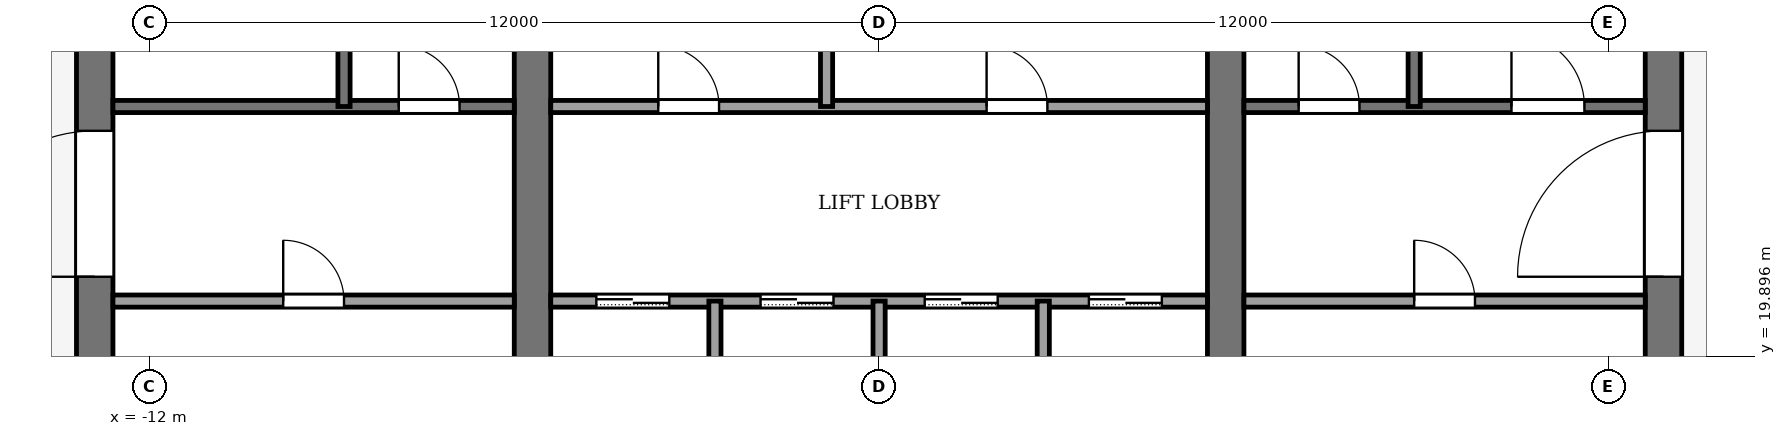
"""IFC4 building model, lengths in metres.
Left out: names, types, materials, properties, quantities, classifications, styles, units other than length and angle.
Written with IfcOpenShell. Run it as: python <this file> out.ifc"""

import sys

from ifc_helpers import new_model, si_unit, direction, frame, frame_2d, origin, place, context, subcontext, project, spatial, rectangle, extrude, element, fill, save


model = new_model("IFC4")
c1 = context("Model", 3, precision=1e-05, world=origin(), true_north=direction((0.0, 1.0)))
c2 = subcontext(c1, "Body", "Model", "MODEL_VIEW")
j1 = project(units=[si_unit("LENGTHUNIT", "METRE"), si_unit("PLANEANGLEUNIT", "RADIAN")], contexts=[c1])
p1 = place(None, origin())
s1 = spatial("IfcSite", under=j1, at=p1, CompositionType="ELEMENT")
p2 = place(p1, origin())
s2 = spatial("IfcBuilding", under=s1, at=p2, CompositionType="ELEMENT")
p3 = place(p2, frame((0.0, 0.0, 310.0)))
s3 = spatial("IfcBuildingStorey", under=s2, at=p3, CompositionType="ELEMENT", Elevation=310.0)
p4 = place(p3, frame((-12.9, 18.4, -0.13), z_axis=(0.0, 0.0, 1.0), x_axis=(0.0, 1.0, 0.0)))
e1 = element("IfcWall", 1, at=p4, inside=s3, PredefinedType="SHEAR", context=c2, shape_type="SweptSolid", body=[
    extrude(rectangle(XDim=19.2, YDim=0.6, at=frame_2d((9.6, 0.0))), origin(), (0.0, 0.0, 1.0), 4.0),
])
p5 = place(p4, frame((2.8, 0.0, 0.13)))
e2 = element("IfcOpeningElement", 2, at=p5, cuts=e1, PredefinedType="OPENING", context=c2, shape_type="SweptSolid", body=[
    extrude(rectangle(XDim=2.4, YDim=2.4, at=frame_2d((1.2, 1.2))), frame((0.0, 0.31, 0.0), z_axis=(0.0, -1.0, 0.0), x_axis=(1.0, 0.0, 0.0)), (0.0, 0.0, 1.0), 0.62),
])
p6 = place(p4, frame((13.4, 0.0, 0.13)))
e3 = element("IfcOpeningElement", 3, at=p6, cuts=e1, PredefinedType="OPENING", context=c2, shape_type="SweptSolid", body=[
    extrude(rectangle(XDim=1.4, YDim=2.2, at=frame_2d((0.7, 1.1))), frame((0.0, 0.31, 0.0), z_axis=(0.0, -1.0, 0.0), x_axis=(1.0, 0.0, 0.0)), (0.0, 0.0, 1.0), 0.62),
])
p7 = place(p3, frame((12.9, 18.4, -0.13), z_axis=(0.0, 0.0, 1.0), x_axis=(0.0, 1.0, 0.0)))
e4 = element("IfcWall", 4, at=p7, inside=s3, PredefinedType="SHEAR", context=c2, shape_type="SweptSolid", body=[
    extrude(rectangle(XDim=19.2, YDim=0.6, at=frame_2d((9.6, 0.0))), origin(), (0.0, 0.0, 1.0), 4.0),
])
p8 = place(p7, frame((2.8, 0.0, 0.13)))
e5 = element("IfcOpeningElement", 5, at=p8, cuts=e4, PredefinedType="OPENING", context=c2, shape_type="SweptSolid", body=[
    extrude(rectangle(XDim=2.4, YDim=2.4, at=frame_2d((1.2, 1.2))), frame((0.0, 0.31, 0.0), z_axis=(0.0, -1.0, 0.0), x_axis=(1.0, 0.0, 0.0)), (0.0, 0.0, 1.0), 0.62),
])
p9 = place(p7, frame((13.3, 0.0, 0.13)))
e6 = element("IfcOpeningElement", 6, at=p9, cuts=e4, PredefinedType="OPENING", context=c2, shape_type="SweptSolid", body=[
    extrude(rectangle(XDim=2.4, YDim=2.4, at=frame_2d((1.2, 1.2))), frame((0.0, 0.31, 0.0), z_axis=(0.0, -1.0, 0.0), x_axis=(1.0, 0.0, 0.0)), (0.0, 0.0, 1.0), 0.62),
])
p10 = place(p3, frame((-5.7, 18.4, -0.13), z_axis=(0.0, 0.0, 1.0), x_axis=(0.0, 1.0, 0.0)))
e7 = element("IfcWall", 7, at=p10, inside=s3, PredefinedType="SHEAR", context=c2, shape_type="SweptSolid", body=[
    extrude(rectangle(XDim=19.2, YDim=0.6, at=frame_2d((9.6, 0.0))), origin(), (0.0, 0.0, 1.0), 4.0),
])
p11 = place(p10, frame((8.35, 0.0, 0.13)))
e8 = element("IfcOpeningElement", 8, at=p11, cuts=e7, PredefinedType="OPENING", context=c2, shape_type="SweptSolid", body=[
    extrude(rectangle(XDim=0.9, YDim=2.1, at=frame_2d((0.45, 1.05))), frame((0.0, 0.31, 0.0), z_axis=(0.0, -1.0, 0.0), x_axis=(1.0, 0.0, 0.0)), (0.0, 0.0, 1.0), 0.62),
])
p12 = place(p3, frame((5.7, 18.4, -0.13), z_axis=(0.0, 0.0, 1.0), x_axis=(0.0, 1.0, 0.0)))
e9 = element("IfcWall", 9, at=p12, inside=s3, PredefinedType="SHEAR", context=c2, shape_type="SweptSolid", body=[
    extrude(rectangle(XDim=19.2, YDim=0.6, at=frame_2d((9.6, 0.0))), origin(), (0.0, 0.0, 1.0), 4.0),
])
p13 = place(p12, frame((13.3, 0.0, 0.13)))
e10 = element("IfcOpeningElement", 10, at=p13, cuts=e9, PredefinedType="OPENING", context=c2, shape_type="SweptSolid", body=[
    extrude(rectangle(XDim=2.4, YDim=2.4, at=frame_2d((1.2, 1.2))), frame((0.0, 0.31, 0.0), z_axis=(0.0, -1.0, 0.0), x_axis=(1.0, 0.0, 0.0)), (0.0, 0.0, 1.0), 0.62),
])
p14 = place(p3, frame((-12.6, 20.8, 0.0), z_axis=(0.0, 0.0, 1.0), x_axis=(1.0, 0.0, 0.0)))
e11 = element("IfcWall", 11, at=p14, inside=s3, PredefinedType="PARTITIONING", context=c2, shape_type="SweptSolid", body=[
    extrude(rectangle(XDim=6.6, YDim=0.2, at=frame_2d((3.3, 0.0))), origin(), (0.0, 0.0, 1.0), 3.87),
])
p15 = place(p14, frame((2.8, 0.0, 0.0)))
e12 = element("IfcOpeningElement", 12, at=p15, cuts=e11, PredefinedType="OPENING", context=c2, shape_type="SweptSolid", body=[
    extrude(rectangle(XDim=1.0, YDim=2.1, at=frame_2d((0.5, 1.05))), frame((0.0, 0.11, 0.0), z_axis=(0.0, -1.0, 0.0), x_axis=(1.0, 0.0, 0.0)), (0.0, 0.0, 1.0), 0.22),
])
p16 = place(p3, frame((-5.4, 20.8, 0.0), z_axis=(0.0, 0.0, 1.0), x_axis=(1.0, 0.0, 0.0)))
e13 = element("IfcWall", 13, at=p16, inside=s3, PredefinedType="PARTITIONING", context=c2, shape_type="SweptSolid", body=[
    extrude(rectangle(XDim=10.8, YDim=0.2, at=frame_2d((5.4, 0.0))), origin(), (0.0, 0.0, 1.0), 3.87),
])
p17 = place(p16, frame((0.75, 0.0, 0.0)))
e14 = element("IfcOpeningElement", 14, at=p17, cuts=e13, PredefinedType="OPENING", context=c2, shape_type="SweptSolid", body=[
    extrude(rectangle(XDim=1.2, YDim=2.2, at=frame_2d((0.6, 1.1))), frame((0.0, 0.11, 0.0), z_axis=(0.0, -1.0, 0.0), x_axis=(1.0, 0.0, 0.0)), (0.0, 0.0, 1.0), 0.22),
])
p18 = place(p16, frame((3.45, 0.0, 0.0)))
e15 = element("IfcOpeningElement", 15, at=p18, cuts=e13, PredefinedType="OPENING", context=c2, shape_type="SweptSolid", body=[
    extrude(rectangle(XDim=1.2, YDim=2.2, at=frame_2d((0.6, 1.1))), frame((0.0, 0.11, 0.0), z_axis=(0.0, -1.0, 0.0), x_axis=(1.0, 0.0, 0.0)), (0.0, 0.0, 1.0), 0.22),
])
p19 = place(p16, frame((6.15, 0.0, 0.0)))
e16 = element("IfcOpeningElement", 16, at=p19, cuts=e13, PredefinedType="OPENING", context=c2, shape_type="SweptSolid", body=[
    extrude(rectangle(XDim=1.2, YDim=2.2, at=frame_2d((0.6, 1.1))), frame((0.0, 0.11, 0.0), z_axis=(0.0, -1.0, 0.0), x_axis=(1.0, 0.0, 0.0)), (0.0, 0.0, 1.0), 0.22),
])
p20 = place(p16, frame((8.85, 0.0, 0.0)))
e17 = element("IfcOpeningElement", 17, at=p20, cuts=e13, PredefinedType="OPENING", context=c2, shape_type="SweptSolid", body=[
    extrude(rectangle(XDim=1.2, YDim=2.2, at=frame_2d((0.6, 1.1))), frame((0.0, 0.11, 0.0), z_axis=(0.0, -1.0, 0.0), x_axis=(1.0, 0.0, 0.0)), (0.0, 0.0, 1.0), 0.22),
])
p21 = place(p3, frame((6.0, 20.8, 0.0), z_axis=(0.0, 0.0, 1.0), x_axis=(1.0, 0.0, 0.0)))
e18 = element("IfcWall", 18, at=p21, inside=s3, PredefinedType="PARTITIONING", context=c2, shape_type="SweptSolid", body=[
    extrude(rectangle(XDim=6.6, YDim=0.2, at=frame_2d((3.3, 0.0))), origin(), (0.0, 0.0, 1.0), 3.87),
])
p22 = place(p21, frame((2.8, 0.0, 0.0)))
e19 = element("IfcOpeningElement", 19, at=p22, cuts=e18, PredefinedType="OPENING", context=c2, shape_type="SweptSolid", body=[
    extrude(rectangle(XDim=1.0, YDim=2.1, at=frame_2d((0.5, 1.05))), frame((0.0, 0.11, 0.0), z_axis=(0.0, -1.0, 0.0), x_axis=(1.0, 0.0, 0.0)), (0.0, 0.0, 1.0), 0.22),
])
p23 = place(p3, frame((-12.6, 24.0, 0.0), z_axis=(0.0, 0.0, 1.0), x_axis=(1.0, 0.0, 0.0)))
e20 = element("IfcWall", 20, at=p23, inside=s3, PredefinedType="PARTITIONING", context=c2, shape_type="SweptSolid", body=[
    extrude(rectangle(XDim=6.6, YDim=0.2, at=frame_2d((3.3, 0.0))), origin(), (0.0, 0.0, 1.0), 3.87),
])
p24 = place(p23, frame((4.7, 0.0, 0.0)))
e21 = element("IfcOpeningElement", 21, at=p24, cuts=e20, PredefinedType="OPENING", context=c2, shape_type="SweptSolid", body=[
    extrude(rectangle(XDim=1.0, YDim=2.1, at=frame_2d((0.5, 1.05))), frame((0.0, 0.11, 0.0), z_axis=(0.0, -1.0, 0.0), x_axis=(1.0, 0.0, 0.0)), (0.0, 0.0, 1.0), 0.22),
])
p25 = place(p3, frame((-5.4, 24.0, 0.0), z_axis=(0.0, 0.0, 1.0), x_axis=(1.0, 0.0, 0.0)))
e22 = element("IfcWall", 22, at=p25, inside=s3, PredefinedType="PARTITIONING", context=c2, shape_type="SweptSolid", body=[
    extrude(rectangle(XDim=10.8, YDim=0.2, at=frame_2d((5.4, 0.0))), origin(), (0.0, 0.0, 1.0), 3.87),
])
p26 = place(p25, frame((1.768, 0.0, 0.0)))
e23 = element("IfcOpeningElement", 23, at=p26, cuts=e22, PredefinedType="OPENING", context=c2, shape_type="SweptSolid", body=[
    extrude(rectangle(XDim=1.0, YDim=2.1, at=frame_2d((0.5, 1.05))), frame((0.0, 0.11, 0.0), z_axis=(0.0, -1.0, 0.0), x_axis=(1.0, 0.0, 0.0)), (0.0, 0.0, 1.0), 0.22),
])
p27 = place(p25, frame((7.168, 0.0, 0.0)))
e24 = element("IfcOpeningElement", 24, at=p27, cuts=e22, PredefinedType="OPENING", context=c2, shape_type="SweptSolid", body=[
    extrude(rectangle(XDim=1.0, YDim=2.1, at=frame_2d((0.5, 1.05))), frame((0.0, 0.11, 0.0), z_axis=(0.0, -1.0, 0.0), x_axis=(1.0, 0.0, 0.0)), (0.0, 0.0, 1.0), 0.22),
])
p28 = place(p3, frame((6.0, 24.0, 0.0), z_axis=(0.0, 0.0, 1.0), x_axis=(1.0, 0.0, 0.0)))
e25 = element("IfcWall", 25, at=p28, inside=s3, PredefinedType="PARTITIONING", context=c2, shape_type="SweptSolid", body=[
    extrude(rectangle(XDim=6.6, YDim=0.2, at=frame_2d((3.3, 0.0))), origin(), (0.0, 0.0, 1.0), 3.87),
])
p29 = place(p28, frame((0.9, 0.0, 0.0)))
e26 = element("IfcOpeningElement", 26, at=p29, cuts=e25, PredefinedType="OPENING", context=c2, shape_type="SweptSolid", body=[
    extrude(rectangle(XDim=1.0, YDim=2.1, at=frame_2d((0.5, 1.05))), frame((0.0, 0.11, 0.0), z_axis=(0.0, -1.0, 0.0), x_axis=(1.0, 0.0, 0.0)), (0.0, 0.0, 1.0), 0.22),
])
p30 = place(p28, frame((4.4, 0.0, 0.0)))
e27 = element("IfcOpeningElement", 27, at=p30, cuts=e25, PredefinedType="OPENING", context=c2, shape_type="SweptSolid", body=[
    extrude(rectangle(XDim=1.2, YDim=2.2, at=frame_2d((0.6, 1.1))), frame((0.0, 0.11, 0.0), z_axis=(0.0, -1.0, 0.0), x_axis=(1.0, 0.0, 0.0)), (0.0, 0.0, 1.0), 0.22),
])
p31 = place(p3, frame((-8.8, 24.0, 0.0), z_axis=(0.0, 0.0, 1.0), x_axis=(0.0, 1.0, 0.0)))
e28 = element("IfcWall", 28, at=p31, inside=s3, PredefinedType="PARTITIONING", context=c2, shape_type="SweptSolid", body=[
    extrude(rectangle(XDim=7.4, YDim=0.2, at=frame_2d((3.7, 0.0))), origin(), (0.0, 0.0, 1.0), 3.87),
])
p32 = place(p3, frame((-2.7, 18.4, 0.0), z_axis=(0.0, 0.0, 1.0), x_axis=(0.0, 1.0, 0.0)))
e29 = element("IfcWall", 29, at=p32, inside=s3, PredefinedType="PARTITIONING", context=c2, shape_type="SweptSolid", body=[
    extrude(rectangle(XDim=2.4, YDim=0.2, at=frame_2d((1.2, 0.0))), origin(), (0.0, 0.0, 1.0), 3.87),
])
p33 = place(p3, frame((-0.864, 24.0, 0.0), z_axis=(0.0, 0.0, 1.0), x_axis=(0.0, 1.0, 0.0)))
e30 = element("IfcWall", 30, at=p33, inside=s3, PredefinedType="PARTITIONING", context=c2, shape_type="SweptSolid", body=[
    extrude(rectangle(XDim=2.4, YDim=0.2, at=frame_2d((1.2, 0.0))), origin(), (0.0, 0.0, 1.0), 3.87),
])
for number, where, z_axis, x_axis in (
    (31, (0.0, 18.4, 0.0), (0.0, 0.0, 1.0), (0.0, 1.0, 0.0)),
    (32, (2.7, 18.4, 0.0), (0.0, 0.0, 1.0), (0.0, 1.0, 0.0)),
):
    element("IfcWall", number, at=place(p3, frame(where, z_axis=z_axis, x_axis=x_axis)), inside=s3, PredefinedType="PARTITIONING", context=c2, shape_type="SweptSolid", body=[
        extrude(rectangle(XDim=2.4, YDim=0.2, at=frame_2d((1.2, 0.0))), origin(), (0.0, 0.0, 1.0), 3.87),
    ])
p34 = place(p3, frame((8.8, 24.0, 0.0), z_axis=(0.0, 0.0, 1.0), x_axis=(0.0, 1.0, 0.0)))
e33 = element("IfcWall", 33, at=p34, inside=s3, PredefinedType="PARTITIONING", context=c2, shape_type="SweptSolid", body=[
    extrude(rectangle(XDim=7.4, YDim=0.2, at=frame_2d((3.7, 0.0))), origin(), (0.0, 0.0, 1.0), 3.87),
])
p35 = place(p17, origin())
e34 = element("IfcDoor", 34, at=p35, inside=s3, OperationType="SLIDING_TO_LEFT", PredefinedType="DOOR", context=c2, shape_type="SweptSolid", body=[
    extrude(rectangle(XDim=1.2, YDim=2.2, at=frame_2d((0.6, 1.1))), frame((0.0, 0.025, 0.0), z_axis=(0.0, -1.0, 0.0), x_axis=(1.0, 0.0, 0.0)), (0.0, 0.0, 1.0), 0.05),
])
fill(e14, e34)
p36 = place(p18, origin())
e35 = element("IfcDoor", 35, at=p36, inside=s3, OperationType="SLIDING_TO_LEFT", PredefinedType="DOOR", context=c2, shape_type="SweptSolid", body=[
    extrude(rectangle(XDim=1.2, YDim=2.2, at=frame_2d((0.6, 1.1))), frame((0.0, 0.025, 0.0), z_axis=(0.0, -1.0, 0.0), x_axis=(1.0, 0.0, 0.0)), (0.0, 0.0, 1.0), 0.05),
])
fill(e15, e35)
p37 = place(p19, origin())
e36 = element("IfcDoor", 36, at=p37, inside=s3, OperationType="SLIDING_TO_LEFT", PredefinedType="DOOR", context=c2, shape_type="SweptSolid", body=[
    extrude(rectangle(XDim=1.2, YDim=2.2, at=frame_2d((0.6, 1.1))), frame((0.0, 0.025, 0.0), z_axis=(0.0, -1.0, 0.0), x_axis=(1.0, 0.0, 0.0)), (0.0, 0.0, 1.0), 0.05),
])
fill(e16, e36)
p38 = place(p20, origin())
e37 = element("IfcDoor", 37, at=p38, inside=s3, OperationType="SLIDING_TO_LEFT", PredefinedType="DOOR", context=c2, shape_type="SweptSolid", body=[
    extrude(rectangle(XDim=1.2, YDim=2.2, at=frame_2d((0.6, 1.1))), frame((0.0, 0.025, 0.0), z_axis=(0.0, -1.0, 0.0), x_axis=(1.0, 0.0, 0.0)), (0.0, 0.0, 1.0), 0.05),
])
fill(e17, e37)
p39 = place(p26, origin())
e38 = element("IfcDoor", 38, at=p39, inside=s3, OperationType="SINGLE_SWING_LEFT", PredefinedType="DOOR", context=c2, shape_type="SweptSolid", body=[
    extrude(rectangle(XDim=1.0, YDim=2.1, at=frame_2d((0.5, 1.05))), frame((0.0, 0.025, 0.0), z_axis=(0.0, -1.0, 0.0), x_axis=(1.0, 0.0, 0.0)), (0.0, 0.0, 1.0), 0.05),
])
fill(e23, e38)
p40 = place(p27, origin())
e39 = element("IfcDoor", 39, at=p40, inside=s3, OperationType="SINGLE_SWING_RIGHT", PredefinedType="DOOR", context=c2, shape_type="SweptSolid", body=[
    extrude(rectangle(XDim=1.0, YDim=2.1, at=frame_2d((0.5, 1.05))), frame((0.0, 0.025, 0.0), z_axis=(0.0, -1.0, 0.0), x_axis=(1.0, 0.0, 0.0)), (0.0, 0.0, 1.0), 0.05),
])
fill(e24, e39)
p41 = place(p15, origin())
e40 = element("IfcDoor", 40, at=p41, inside=s3, OperationType="SINGLE_SWING_LEFT", PredefinedType="DOOR", context=c2, shape_type="SweptSolid", body=[
    extrude(rectangle(XDim=1.0, YDim=2.1, at=frame_2d((0.5, 1.05))), frame((0.0, 0.025, 0.0), z_axis=(0.0, -1.0, 0.0), x_axis=(1.0, 0.0, 0.0)), (0.0, 0.0, 1.0), 0.05),
])
fill(e12, e40)
p42 = place(p22, origin())
e41 = element("IfcDoor", 41, at=p42, inside=s3, OperationType="SINGLE_SWING_RIGHT", PredefinedType="DOOR", context=c2, shape_type="SweptSolid", body=[
    extrude(rectangle(XDim=1.0, YDim=2.1, at=frame_2d((0.5, 1.05))), frame((0.0, 0.025, 0.0), z_axis=(0.0, -1.0, 0.0), x_axis=(1.0, 0.0, 0.0)), (0.0, 0.0, 1.0), 0.05),
])
fill(e19, e41)
p43 = place(p24, origin())
e42 = element("IfcDoor", 42, at=p43, inside=s3, OperationType="SINGLE_SWING_RIGHT", PredefinedType="DOOR", context=c2, shape_type="SweptSolid", body=[
    extrude(rectangle(XDim=1.0, YDim=2.1, at=frame_2d((0.5, 1.05))), frame((0.0, 0.025, 0.0), z_axis=(0.0, -1.0, 0.0), x_axis=(1.0, 0.0, 0.0)), (0.0, 0.0, 1.0), 0.05),
])
fill(e21, e42)
p44 = place(p29, origin())
e43 = element("IfcDoor", 43, at=p44, inside=s3, OperationType="SINGLE_SWING_LEFT", PredefinedType="DOOR", context=c2, shape_type="SweptSolid", body=[
    extrude(rectangle(XDim=1.0, YDim=2.1, at=frame_2d((0.5, 1.05))), frame((0.0, 0.025, 0.0), z_axis=(0.0, -1.0, 0.0), x_axis=(1.0, 0.0, 0.0)), (0.0, 0.0, 1.0), 0.05),
])
fill(e26, e43)
p45 = place(p30, origin())
e44 = element("IfcDoor", 44, at=p45, inside=s3, OperationType="SINGLE_SWING_LEFT", PredefinedType="DOOR", context=c2, shape_type="SweptSolid", body=[
    extrude(rectangle(XDim=1.2, YDim=2.2, at=frame_2d((0.6, 1.1))), frame((0.0, 0.025, 0.0), z_axis=(0.0, -1.0, 0.0), x_axis=(1.0, 0.0, 0.0)), (0.0, 0.0, 1.0), 0.05),
])
fill(e27, e44)
p46 = place(p5, origin())
e45 = element("IfcDoor", 45, at=p46, inside=s3, OperationType="DOUBLE_DOOR_SINGLE_SWING", PredefinedType="DOOR", context=c2, shape_type="SweptSolid", body=[
    extrude(rectangle(XDim=2.4, YDim=2.4, at=frame_2d((1.2, 1.2))), frame((0.0, 0.025, 0.0), z_axis=(0.0, -1.0, 0.0), x_axis=(1.0, 0.0, 0.0)), (0.0, 0.0, 1.0), 0.05),
])
fill(e2, e45)
p47 = place(p8, origin())
e46 = element("IfcDoor", 46, at=p47, inside=s3, OperationType="DOUBLE_DOOR_SINGLE_SWING", PredefinedType="DOOR", context=c2, shape_type="SweptSolid", body=[
    extrude(rectangle(XDim=2.4, YDim=2.4, at=frame_2d((1.2, 1.2))), frame((0.0, 0.025, 0.0), z_axis=(0.0, -1.0, 0.0), x_axis=(1.0, 0.0, 0.0)), (0.0, 0.0, 1.0), 0.05),
])
fill(e5, e46)
save(model, sys.argv[1])
